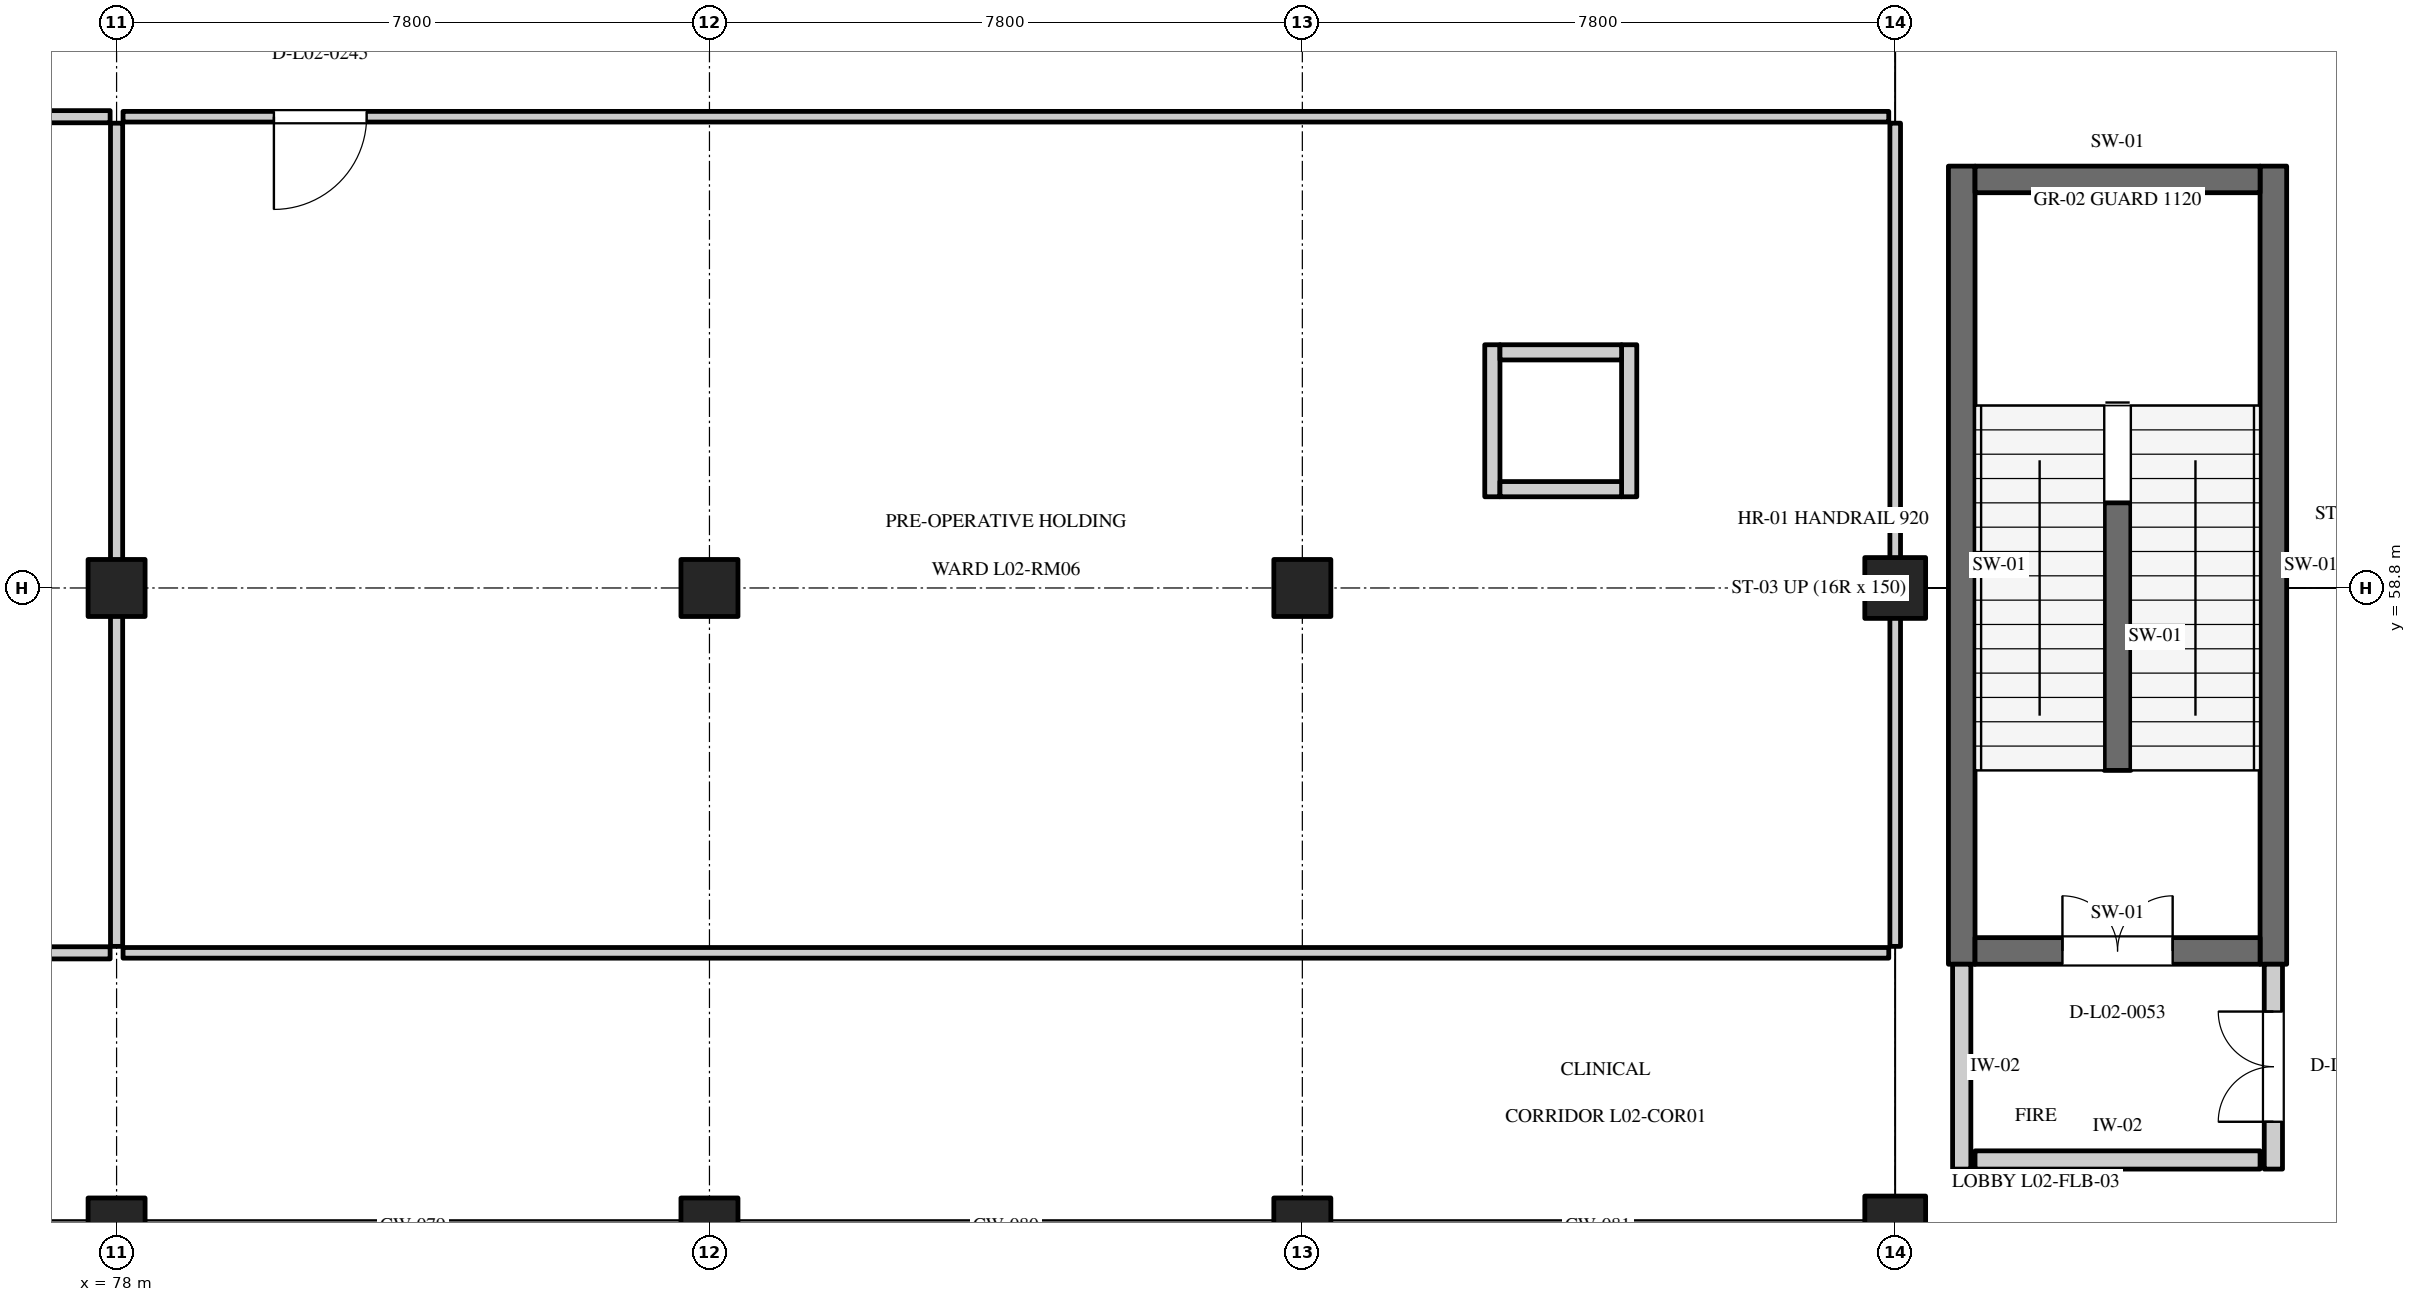
"""IFC4 building model, lengths in metres.
Left out: names, types, materials, properties, quantities, classifications, styles, units other than length and angle.
Written with IfcOpenShell. Run it as: python <this file> out.ifc"""

import sys

from ifc_helpers import new_model, si_unit, direction, frame, frame_2d, origin, origin_2d, place, context, subcontext, project, spatial, rectangle, extrude, element, fill, save


model = new_model("IFC4")
c1 = context("Model", 3, precision=1e-05, world=origin(), true_north=direction((0.0, 1.0)))
c2 = subcontext(c1, "Body", "Model", "MODEL_VIEW")
j1 = project(units=[si_unit("LENGTHUNIT", "METRE"), si_unit("PLANEANGLEUNIT", "RADIAN")], contexts=[c1])
p1 = place(None, origin())
s1 = spatial("IfcSite", under=j1, at=p1, CompositionType="ELEMENT")
p2 = place(p1, origin())
s2 = spatial("IfcBuilding", under=s1, at=p2, CompositionType="ELEMENT")
p3 = place(p2, frame((0.0, 0.0, 9.6)))
s3 = spatial("IfcBuildingStorey", under=s2, at=p3, CompositionType="ELEMENT", Elevation=9.6)
for number, where, z_axis, x_axis in (
    (1, (78.0, 50.4, 0.0), (0.0, 0.0, 1.0), (1.0, 0.0, 0.0)),
    (2, (78.0, 58.8, 0.0), (0.0, 0.0, 1.0), (1.0, 0.0, 0.0)),
    (3, (85.8, 50.4, 0.0), (0.0, 0.0, 1.0), (1.0, 0.0, 0.0)),
    (4, (85.8, 58.8, 0.0), (0.0, 0.0, 1.0), (1.0, 0.0, 0.0)),
    (5, (93.6, 50.4, 0.0), (0.0, 0.0, 1.0), (1.0, 0.0, 0.0)),
    (6, (93.6, 58.8, 0.0), (0.0, 0.0, 1.0), (1.0, 0.0, 0.0)),
):
    element("IfcColumn", number, at=place(p3, frame(where, z_axis=z_axis, x_axis=x_axis)), inside=s3, PredefinedType="COLUMN", context=c2, shape_type="SweptSolid", body=[
        extrude(rectangle(XDim=0.75, YDim=0.75, at=origin_2d()), origin(), (0.0, 0.0, 1.0), 4.8),
    ])
for number, where, z_axis, x_axis in (
    (7, (101.4, 50.4, 0.0), (0.0, 0.0, 1.0), (1.0, 0.0, 0.0)),
    (8, (101.4, 58.8, 0.0), (0.0, 0.0, 1.0), (1.0, 0.0, 0.0)),
):
    element("IfcColumn", number, at=place(p3, frame(where, z_axis=z_axis, x_axis=x_axis)), inside=s3, PredefinedType="COLUMN", context=c2, shape_type="SweptSolid", body=[
        extrude(rectangle(XDim=0.8, YDim=0.8, at=origin_2d()), origin(), (0.0, 0.0, 1.0), 4.8),
    ])
for number, where, z_axis, x_axis in (
    (9, (102.275, 53.85, 0.0), (0.0, 0.0, 1.0), (0.0, 1.0, 0.0)),
    (10, (106.375, 53.85, 0.0), (0.0, 0.0, 1.0), (0.0, 1.0, 0.0)),
):
    element("IfcWall", number, at=place(p3, frame(where, z_axis=z_axis, x_axis=x_axis)), inside=s3, PredefinedType="SHEAR", context=c2, shape_type="SweptSolid", body=[
        extrude(rectangle(XDim=10.5, YDim=0.35, at=frame_2d((5.25, 0.0))), origin(), (0.0, 0.0, 1.0), 4.8),
    ])
p4 = place(p3, frame((102.45, 64.175, 0.0), z_axis=(0.0, 0.0, 1.0), x_axis=(1.0, 0.0, 0.0)))
e11 = element("IfcWall", 11, at=p4, inside=s3, PredefinedType="SHEAR", context=c2, shape_type="SweptSolid", body=[
    extrude(rectangle(XDim=3.75, YDim=0.35, at=frame_2d((1.875, 0.0))), origin(), (0.0, 0.0, 1.0), 4.8),
])
p5 = place(p3, frame((102.45, 54.025, 0.0), z_axis=(0.0, 0.0, 1.0), x_axis=(1.0, 0.0, 0.0)))
e12 = element("IfcWall", 12, at=p5, inside=s3, PredefinedType="SHEAR", context=c2, shape_type="SweptSolid", body=[
    extrude(rectangle(XDim=3.75, YDim=0.35, at=frame_2d((1.875, 0.0))), origin(), (0.0, 0.0, 1.0), 4.5),
])
p6 = place(p5, frame((1.15, 0.0, 0.0)))
e13 = element("IfcOpeningElement", 13, at=p6, cuts=e12, PredefinedType="OPENING", context=c2, shape_type="SweptSolid", body=[
    extrude(rectangle(XDim=1.45, YDim=2.2, at=frame_2d((0.725, 1.1))), frame((0.0, 0.187, 0.0), z_axis=(0.0, -1.0, 0.0), x_axis=(1.0, 0.0, 0.0)), (0.0, 0.0, 1.0), 0.374),
])
p7 = place(p3, frame((102.275, 51.155, 0.0), z_axis=(0.0, 0.0, 1.0), x_axis=(0.0, 1.0, 0.0)))
e14 = element("IfcWall", 14, at=p7, inside=s3, PredefinedType="STANDARD", context=c2, shape_type="SweptSolid", body=[
    extrude(rectangle(XDim=2.695, YDim=0.24, at=frame_2d((1.348, 0.0))), origin(), (0.0, 0.0, 1.0), 4.5),
])
p8 = place(p3, frame((106.375, 51.155, 0.0), z_axis=(0.0, 0.0, 1.0), x_axis=(0.0, 1.0, 0.0)))
e15 = element("IfcWall", 15, at=p8, inside=s3, PredefinedType="STANDARD", context=c2, shape_type="SweptSolid", body=[
    extrude(rectangle(XDim=2.695, YDim=0.24, at=frame_2d((1.348, 0.0))), origin(), (0.0, 0.0, 1.0), 4.5),
])
p9 = place(p8, frame((0.623, 0.0, 0.0)))
e16 = element("IfcOpeningElement", 16, at=p9, cuts=e15, PredefinedType="OPENING", context=c2, shape_type="SweptSolid", body=[
    extrude(rectangle(XDim=1.45, YDim=2.2, at=frame_2d((0.725, 1.1))), frame((0.0, 0.132, 0.0), z_axis=(0.0, -1.0, 0.0), x_axis=(1.0, 0.0, 0.0)), (0.0, 0.0, 1.0), 0.264),
])
p10 = place(p3, frame((102.45, 51.275, 0.0), z_axis=(0.0, 0.0, 1.0), x_axis=(1.0, 0.0, 0.0)))
e17 = element("IfcWall", 17, at=p10, inside=s3, PredefinedType="STANDARD", context=c2, shape_type="SweptSolid", body=[
    extrude(rectangle(XDim=3.75, YDim=0.24, at=frame_2d((1.875, 0.0))), origin(), (0.0, 0.0, 1.0), 4.5),
])
p11 = place(p3, frame((104.325, 56.4, 0.0), z_axis=(0.0, 0.0, 1.0), x_axis=(0.0, 1.0, 0.0)))
e18 = element("IfcWall", 18, at=p11, inside=s3, PredefinedType="SHEAR", context=c2, shape_type="SweptSolid", body=[
    extrude(rectangle(XDim=3.52, YDim=0.35, at=frame_2d((1.76, 0.0))), origin(), (0.0, 0.0, 1.0), 4.8),
])
for number, where, z_axis, x_axis in (
    (19, (96.1, 60.0, 0.0), (0.0, 0.0, 1.0), (0.0, 1.0, 0.0)),
    (20, (97.9, 60.0, 0.0), (0.0, 0.0, 1.0), (0.0, 1.0, 0.0)),
):
    element("IfcWall", number, at=place(p3, frame(where, z_axis=z_axis, x_axis=x_axis)), inside=s3, PredefinedType="STANDARD", context=c2, shape_type="SweptSolid", body=[
        extrude(rectangle(XDim=2.0, YDim=0.2, at=frame_2d((1.0, 0.0))), origin(), (0.0, 0.0, 1.0), 4.5),
    ])
for number, where, z_axis, x_axis in (
    (21, (96.2, 60.1, 0.0), (0.0, 0.0, 1.0), (1.0, 0.0, 0.0)),
    (22, (96.2, 61.9, 0.0), (0.0, 0.0, 1.0), (1.0, 0.0, 0.0)),
):
    element("IfcWall", number, at=place(p3, frame(where, z_axis=z_axis, x_axis=x_axis)), inside=s3, PredefinedType="STANDARD", context=c2, shape_type="SweptSolid", body=[
        extrude(rectangle(XDim=1.6, YDim=0.2, at=frame_2d((0.8, 0.0))), origin(), (0.0, 0.0, 1.0), 4.5),
    ])
p12 = place(p3, frame((54.685, 65.0, 0.0), z_axis=(0.0, 0.0, 1.0), x_axis=(1.0, 0.0, 0.0)))
e23 = element("IfcWall", 23, at=p12, inside=s3, PredefinedType="PARTITIONING", context=c2, shape_type="SweptSolid", body=[
    extrude(rectangle(XDim=23.23, YDim=0.16, at=frame_2d((11.615, 0.0))), origin(), (0.0, 0.0, 1.0), 4.48),
])
p13 = place(p12, frame((1.988, 0.0, 0.0)))
e24 = element("IfcOpeningElement", 24, at=p13, cuts=e23, PredefinedType="OPENING", context=c2, shape_type="SweptSolid", body=[
    extrude(rectangle(XDim=1.12, YDim=2.2, at=frame_2d((0.56, 1.1))), frame((0.0, 0.092, 0.0), z_axis=(0.0, -1.0, 0.0), x_axis=(1.0, 0.0, 0.0)), (0.0, 0.0, 1.0), 0.184),
])
p14 = place(p3, frame((54.685, 54.0, 0.0), z_axis=(0.0, 0.0, 1.0), x_axis=(1.0, 0.0, 0.0)))
e25 = element("IfcWall", 25, at=p14, inside=s3, PredefinedType="PARTITIONING", context=c2, shape_type="SweptSolid", body=[
    extrude(rectangle(XDim=23.23, YDim=0.16, at=frame_2d((11.615, 0.0))), origin(), (0.0, 0.0, 1.0), 4.48),
])
p15 = place(p3, frame((78.0, 54.085, 0.0), z_axis=(0.0, 0.0, 1.0), x_axis=(0.0, 1.0, 0.0)))
e26 = element("IfcWall", 26, at=p15, inside=s3, PredefinedType="PARTITIONING", context=c2, shape_type="SweptSolid", body=[
    extrude(rectangle(XDim=10.83, YDim=0.16, at=frame_2d((5.415, 0.0))), origin(), (0.0, 0.0, 1.0), 3.75),
])
p16 = place(p3, frame((78.085, 65.0, 0.0), z_axis=(0.0, 0.0, 1.0), x_axis=(1.0, 0.0, 0.0)))
e27 = element("IfcWall", 27, at=p16, inside=s3, PredefinedType="PARTITIONING", context=c2, shape_type="SweptSolid", body=[
    extrude(rectangle(XDim=23.23, YDim=0.14, at=frame_2d((11.615, 0.0))), origin(), (0.0, 0.0, 1.0), 4.48),
])
p17 = place(p16, frame((1.985, 0.0, 0.0)))
e28 = element("IfcOpeningElement", 28, at=p17, cuts=e27, PredefinedType="OPENING", context=c2, shape_type="SweptSolid", body=[
    extrude(rectangle(XDim=1.22, YDim=2.15, at=frame_2d((0.61, 1.075))), frame((0.0, 0.082, 0.0), z_axis=(0.0, -1.0, 0.0), x_axis=(1.0, 0.0, 0.0)), (0.0, 0.0, 1.0), 0.164),
])
p18 = place(p3, frame((78.085, 54.0, 0.0), z_axis=(0.0, 0.0, 1.0), x_axis=(1.0, 0.0, 0.0)))
e29 = element("IfcWall", 29, at=p18, inside=s3, PredefinedType="PARTITIONING", context=c2, shape_type="SweptSolid", body=[
    extrude(rectangle(XDim=23.23, YDim=0.14, at=frame_2d((11.615, 0.0))), origin(), (0.0, 0.0, 1.0), 4.48),
])
p19 = place(p3, frame((101.4, 54.085, 0.0), z_axis=(0.0, 0.0, 1.0), x_axis=(0.0, 1.0, 0.0)))
e30 = element("IfcWall", 30, at=p19, inside=s3, PredefinedType="PARTITIONING", context=c2, shape_type="SweptSolid", body=[
    extrude(rectangle(XDim=10.83, YDim=0.14, at=frame_2d((5.415, 0.0))), origin(), (0.0, 0.0, 1.0), 3.75),
])
p20 = place(p6, origin())
e31 = element("IfcDoor", 31, at=p20, inside=s3, OperationType="DOUBLE_DOOR_SINGLE_SWING", PredefinedType="DOOR", context=c2, shape_type="SweptSolid", body=[
    extrude(rectangle(XDim=1.45, YDim=2.2, at=frame_2d((0.725, 1.1))), frame((0.0, 0.025, 0.0), z_axis=(0.0, -1.0, 0.0), x_axis=(1.0, 0.0, 0.0)), (0.0, 0.0, 1.0), 0.05),
])
fill(e13, e31)
p21 = place(p9, origin())
e32 = element("IfcDoor", 32, at=p21, inside=s3, OperationType="DOUBLE_DOOR_SINGLE_SWING", PredefinedType="DOOR", context=c2, shape_type="SweptSolid", body=[
    extrude(rectangle(XDim=1.45, YDim=2.2, at=frame_2d((0.725, 1.1))), frame((0.0, 0.025, 0.0), z_axis=(0.0, -1.0, 0.0), x_axis=(1.0, 0.0, 0.0)), (0.0, 0.0, 1.0), 0.05),
])
fill(e16, e32)
p22 = place(p17, frame((1.22, 0.0, 0.0), z_axis=(0.0, 0.0, 1.0), x_axis=(-1.0, 0.0, 0.0)))
e33 = element("IfcDoor", 33, at=p22, inside=s3, OperationType="SINGLE_SWING_RIGHT", PredefinedType="DOOR", context=c2, shape_type="SweptSolid", body=[
    extrude(rectangle(XDim=1.22, YDim=2.15, at=frame_2d((0.61, 1.075))), frame((0.0, 0.025, 0.0), z_axis=(0.0, -1.0, 0.0), x_axis=(1.0, 0.0, 0.0)), (0.0, 0.0, 1.0), 0.05),
])
fill(e28, e33)
save(model, sys.argv[1])
